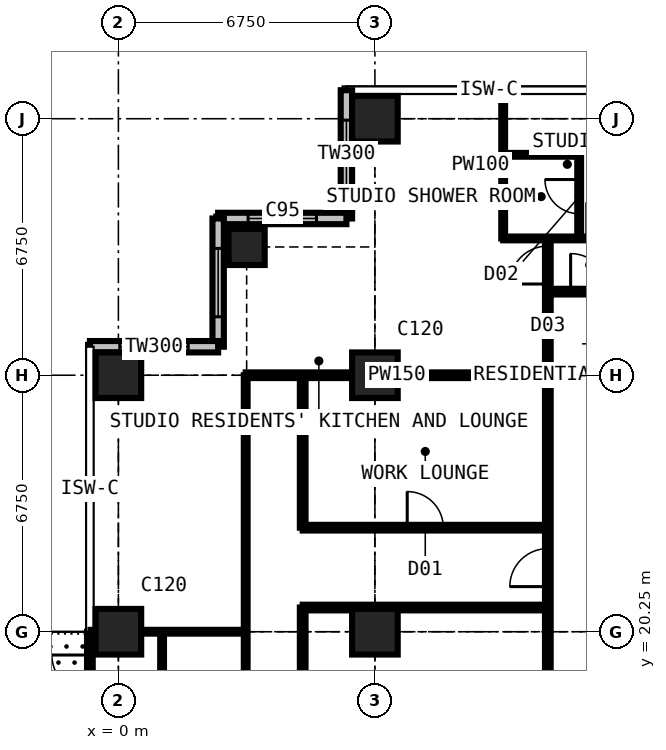
"""IFC4 building model, lengths in metres.
Left out: names, types, materials, properties, quantities, classifications, styles, units other than length and angle.
Written with IfcOpenShell. Run it as: python <this file> out.ifc"""

import sys

from ifc_helpers import new_model, si_unit, direction, frame, frame_2d, origin, origin_2d, place, context, subcontext, project, spatial, rectangle, extrude, element, fill, save


model = new_model("IFC4")
c1 = context("Model", 3, precision=1e-05, world=origin(), true_north=direction((0.0, 1.0)))
c2 = subcontext(c1, "Body", "Model", "MODEL_VIEW")
j1 = project(units=[si_unit("LENGTHUNIT", "METRE"), si_unit("PLANEANGLEUNIT", "RADIAN")], contexts=[c1])
p1 = place(None, origin())
s1 = spatial("IfcSite", under=j1, at=p1, CompositionType="ELEMENT")
p2 = place(p1, origin())
s2 = spatial("IfcBuilding", under=s1, at=p2, CompositionType="ELEMENT")
p3 = place(p2, frame((0.0, 0.0, 192.6)))
s3 = spatial("IfcBuildingStorey", under=s2, at=p3, CompositionType="ELEMENT", Elevation=192.6)
for number, where, z_axis, x_axis in (
    (1, (0.0, 20.25, 0.0), (0.0, 0.0, 1.0), (1.0, 0.0, 0.0)),
    (2, (0.0, 27.0, 0.0), (0.0, 0.0, 1.0), (1.0, 0.0, 0.0)),
):
    element("IfcColumn", number, at=place(p3, frame(where, z_axis=z_axis, x_axis=x_axis)), inside=s3, PredefinedType="COLUMN", context=c2, shape_type="SweptSolid", body=[
        extrude(rectangle(XDim=1.2, YDim=1.2, at=origin_2d()), origin(), (0.0, 0.0, 1.0), 3.6),
    ])
p4 = place(p3, frame((3.375, 30.375, 0.0), z_axis=(0.0, 0.0, 1.0), x_axis=(1.0, 0.0, 0.0)))
e3 = element("IfcColumn", 3, at=p4, inside=s3, PredefinedType="COLUMN", context=c2, shape_type="SweptSolid", body=[
    extrude(rectangle(XDim=0.95, YDim=0.95, at=origin_2d()), origin(), (0.0, 0.0, 1.0), 3.6),
])
for number, where, z_axis, x_axis in (
    (4, (6.75, 20.25, 0.0), (0.0, 0.0, 1.0), (1.0, 0.0, 0.0)),
    (5, (6.75, 27.0, 0.0), (0.0, 0.0, 1.0), (1.0, 0.0, 0.0)),
    (6, (6.75, 33.75, 0.0), (0.0, 0.0, 1.0), (1.0, 0.0, 0.0)),
):
    element("IfcColumn", number, at=place(p3, frame(where, z_axis=z_axis, x_axis=x_axis)), inside=s3, PredefinedType="COLUMN", context=c2, shape_type="SweptSolid", body=[
        extrude(rectangle(XDim=1.2, YDim=1.2, at=origin_2d()), origin(), (0.0, 0.0, 1.0), 3.6),
    ])
p5 = place(p3, frame((6.0, 34.5, 0.0), z_axis=(0.0, 0.0, 1.0), x_axis=(0.0, -1.0, 0.0)))
e7 = element("IfcWall", 7, at=p5, inside=s3, PredefinedType="SOLIDWALL", context=c2, shape_type="SweptSolid", body=[
    extrude(rectangle(XDim=3.375, YDim=0.3, at=frame_2d((1.688, 0.0))), origin(), (0.0, 0.0, 1.0), 3.375),
])
p6 = place(p5, frame((0.788, 0.0, 0.6)))
e8 = element("IfcOpeningElement", 8, at=p6, cuts=e7, PredefinedType="OPENING", context=c2, shape_type="SweptSolid", body=[
    extrude(rectangle(XDim=1.8, YDim=2.1, at=frame_2d((0.9, 1.05))), frame((0.0, 0.16, 0.0), z_axis=(0.0, -1.0, 0.0), x_axis=(1.0, 0.0, 0.0)), (0.0, 0.0, 1.0), 0.32),
])
p7 = place(p3, frame((6.0, 31.125, 0.0), z_axis=(0.0, 0.0, 1.0), x_axis=(-1.0, 0.0, 0.0)))
e9 = element("IfcWall", 9, at=p7, inside=s3, PredefinedType="SOLIDWALL", context=c2, shape_type="SweptSolid", body=[
    extrude(rectangle(XDim=3.375, YDim=0.3, at=frame_2d((1.688, 0.0))), origin(), (0.0, 0.0, 1.0), 3.375),
])
p8 = place(p7, frame((0.788, 0.0, 0.6)))
e10 = element("IfcOpeningElement", 10, at=p8, cuts=e9, PredefinedType="OPENING", context=c2, shape_type="SweptSolid", body=[
    extrude(rectangle(XDim=1.8, YDim=2.1, at=frame_2d((0.9, 1.05))), frame((0.0, 0.16, 0.0), z_axis=(0.0, -1.0, 0.0), x_axis=(1.0, 0.0, 0.0)), (0.0, 0.0, 1.0), 0.32),
])
p9 = place(p3, frame((2.625, 31.125, 0.0), z_axis=(0.0, 0.0, 1.0), x_axis=(0.0, -1.0, 0.0)))
e11 = element("IfcWall", 11, at=p9, inside=s3, PredefinedType="SOLIDWALL", context=c2, shape_type="SweptSolid", body=[
    extrude(rectangle(XDim=3.375, YDim=0.3, at=frame_2d((1.688, 0.0))), origin(), (0.0, 0.0, 1.0), 3.375),
])
p10 = place(p9, frame((0.788, 0.0, 0.6)))
e12 = element("IfcOpeningElement", 12, at=p10, cuts=e11, PredefinedType="OPENING", context=c2, shape_type="SweptSolid", body=[
    extrude(rectangle(XDim=1.8, YDim=2.1, at=frame_2d((0.9, 1.05))), frame((0.0, 0.16, 0.0), z_axis=(0.0, -1.0, 0.0), x_axis=(1.0, 0.0, 0.0)), (0.0, 0.0, 1.0), 0.32),
])
p11 = place(p3, frame((2.625, 27.75, 0.0), z_axis=(0.0, 0.0, 1.0), x_axis=(-1.0, 0.0, 0.0)))
e13 = element("IfcWall", 13, at=p11, inside=s3, PredefinedType="SOLIDWALL", context=c2, shape_type="SweptSolid", body=[
    extrude(rectangle(XDim=3.375, YDim=0.3, at=frame_2d((1.688, 0.0))), origin(), (0.0, 0.0, 1.0), 3.375),
])
p12 = place(p11, frame((0.788, 0.0, 0.6)))
e14 = element("IfcOpeningElement", 14, at=p12, cuts=e13, PredefinedType="OPENING", context=c2, shape_type="SweptSolid", body=[
    extrude(rectangle(XDim=1.8, YDim=2.1, at=frame_2d((0.9, 1.05))), frame((0.0, 0.16, 0.0), z_axis=(0.0, -1.0, 0.0), x_axis=(1.0, 0.0, 0.0)), (0.0, 0.0, 1.0), 0.32),
])
p13 = place(p3, frame((-0.75, 13.5, 0.0), z_axis=(0.0, 0.0, 1.0), x_axis=(0.0, 1.0, 0.0)))
e15 = element("IfcWall", 15, at=p13, inside=s3, PredefinedType="SOLIDWALL", context=c2, shape_type="SweptSolid", body=[
    extrude(rectangle(XDim=6.75, YDim=0.15, at=frame_2d((3.375, 0.0))), origin(), (0.0, 0.0, 1.0), 3.375),
])
p14 = place(p13, frame((0.613, 0.0, 0.0)))
e16 = element("IfcOpeningElement", 16, at=p14, cuts=e15, PredefinedType="OPENING", context=c2, shape_type="SweptSolid", body=[
    extrude(rectangle(XDim=1.0, YDim=2.2, at=frame_2d((0.5, 1.1))), frame((0.0, 0.085, 0.0), z_axis=(0.0, -1.0, 0.0), x_axis=(1.0, 0.0, 0.0)), (0.0, 0.0, 1.0), 0.17),
])
p15 = place(p13, frame((1.725, 0.0, 0.9)))
e17 = element("IfcOpeningElement", 17, at=p15, cuts=e15, PredefinedType="OPENING", context=c2, shape_type="SweptSolid", body=[
    extrude(rectangle(XDim=1.2, YDim=1.8, at=frame_2d((0.6, 0.9))), frame((0.0, 0.085, 0.0), z_axis=(0.0, -1.0, 0.0), x_axis=(1.0, 0.0, 0.0)), (0.0, 0.0, 1.0), 0.17),
])
p16 = place(p13, frame((5.137, 0.0, 0.0)))
e18 = element("IfcOpeningElement", 18, at=p16, cuts=e15, PredefinedType="OPENING", context=c2, shape_type="SweptSolid", body=[
    extrude(rectangle(XDim=1.0, YDim=2.2, at=frame_2d((0.5, 1.1))), frame((0.0, 0.085, 0.0), z_axis=(0.0, -1.0, 0.0), x_axis=(1.0, 0.0, 0.0)), (0.0, 0.0, 1.0), 0.17),
])
p17 = place(p13, frame((3.825, 0.0, 0.9)))
e19 = element("IfcOpeningElement", 19, at=p17, cuts=e15, PredefinedType="OPENING", context=c2, shape_type="SweptSolid", body=[
    extrude(rectangle(XDim=1.2, YDim=1.8, at=frame_2d((0.6, 0.9))), frame((0.0, 0.085, 0.0), z_axis=(0.0, -1.0, 0.0), x_axis=(1.0, 0.0, 0.0)), (0.0, 0.0, 1.0), 0.17),
])
p18 = place(p3, frame((-0.734, 20.25, 0.0), z_axis=(0.0, 0.0, 1.0), x_axis=(1.0, 0.0, 0.0)))
e20 = element("IfcWall", 20, at=p18, inside=s3, PredefinedType="PARTITIONING", context=c2, shape_type="SweptSolid", body=[
    extrude(rectangle(XDim=4.084, YDim=0.1, at=frame_2d((2.042, 0.0))), origin(), (0.0, 0.0, 1.0), 2.877),
])
p19 = place(p3, frame((1.15, 18.25, 0.0), z_axis=(0.0, 0.0, 1.0), x_axis=(0.0, 1.0, 0.0)))
e21 = element("IfcWall", 21, at=p19, inside=s3, PredefinedType="PARTITIONING", context=c2, shape_type="SweptSolid", body=[
    extrude(rectangle(XDim=2.0, YDim=0.1, at=frame_2d((1.0, 0.0))), origin(), (0.0, 0.0, 1.0), 3.375),
])
p20 = place(p3, frame((3.35, 10.125, 0.0), z_axis=(0.0, 0.0, 1.0), x_axis=(0.0, 1.0, 0.0)))
e22 = element("IfcWall", 22, at=p20, inside=s3, PredefinedType="PARTITIONING", context=c2, shape_type="SweptSolid", body=[
    extrude(rectangle(XDim=16.875, YDim=0.1, at=frame_2d((8.438, 0.0))), origin(), (0.0, 0.0, 1.0), 3.375),
])
p21 = place(p20, frame((0.2, 0.0, 0.0)))
e23 = element("IfcOpeningElement", 23, at=p21, cuts=e22, PredefinedType="OPENING", context=c2, shape_type="SweptSolid", body=[
    extrude(rectangle(XDim=0.95, YDim=2.2, at=frame_2d((0.475, 1.1))), frame((0.0, 0.06, 0.0), z_axis=(0.0, -1.0, 0.0), x_axis=(1.0, 0.0, 0.0)), (0.0, 0.0, 1.0), 0.12),
])
p22 = place(p20, frame((3.575, 0.0, 0.0)))
e24 = element("IfcOpeningElement", 24, at=p22, cuts=e22, PredefinedType="OPENING", context=c2, shape_type="SweptSolid", body=[
    extrude(rectangle(XDim=0.95, YDim=2.2, at=frame_2d((0.475, 1.1))), frame((0.0, 0.06, 0.0), z_axis=(0.0, -1.0, 0.0), x_axis=(1.0, 0.0, 0.0)), (0.0, 0.0, 1.0), 0.12),
])
p23 = place(p20, frame((6.95, 0.0, 0.0)))
e25 = element("IfcOpeningElement", 25, at=p23, cuts=e22, PredefinedType="OPENING", context=c2, shape_type="SweptSolid", body=[
    extrude(rectangle(XDim=0.95, YDim=2.2, at=frame_2d((0.475, 1.1))), frame((0.0, 0.06, 0.0), z_axis=(0.0, -1.0, 0.0), x_axis=(1.0, 0.0, 0.0)), (0.0, 0.0, 1.0), 0.12),
])
p24 = place(p3, frame((3.35, 27.0, 0.0), z_axis=(0.0, 0.0, 1.0), x_axis=(1.0, 0.0, 0.0)))
e26 = element("IfcWall", 26, at=p24, inside=s3, PredefinedType="PARTITIONING", context=c2, shape_type="SweptSolid", body=[
    extrude(rectangle(XDim=7.95, YDim=0.15, at=frame_2d((3.975, 0.0))), origin(), (0.0, 0.0, 1.0), 2.806),
])
p25 = place(p3, frame((4.85, 12.775, 0.0), z_axis=(0.0, 0.0, 1.0), x_axis=(0.0, 1.0, 0.0)))
e27 = element("IfcWall", 27, at=p25, inside=s3, PredefinedType="PARTITIONING", context=c2, shape_type="SweptSolid", body=[
    extrude(rectangle(XDim=8.113, YDim=0.15, at=frame_2d((4.056, 0.0))), origin(), (0.0, 0.0, 1.0), 3.375),
])
p26 = place(p25, frame((3.6, 0.0, 0.0)))
e28 = element("IfcOpeningElement", 28, at=p26, cuts=e27, PredefinedType="OPENING", context=c2, shape_type="SweptSolid", body=[
    extrude(rectangle(XDim=0.95, YDim=2.2, at=frame_2d((0.475, 1.1))), frame((0.0, 0.085, 0.0), z_axis=(0.0, -1.0, 0.0), x_axis=(1.0, 0.0, 0.0)), (0.0, 0.0, 1.0), 0.17),
])
p27 = place(p3, frame((4.85, 20.887, 0.0), z_axis=(0.0, 0.0, 1.0), x_axis=(1.0, 0.0, 0.0)))
e29 = element("IfcWall", 29, at=p27, inside=s3, PredefinedType="PARTITIONING", context=c2, shape_type="SweptSolid", body=[
    extrude(rectangle(XDim=6.45, YDim=0.15, at=frame_2d((3.225, 0.0))), origin(), (0.0, 0.0, 1.0), 3.375),
])
p28 = place(p3, frame((4.85, 22.988, 0.0), z_axis=(0.0, 0.0, 1.0), x_axis=(0.0, 1.0, 0.0)))
e30 = element("IfcWall", 30, at=p28, inside=s3, PredefinedType="PARTITIONING", context=c2, shape_type="SweptSolid", body=[
    extrude(rectangle(XDim=4.012, YDim=0.15, at=frame_2d((2.006, 0.0))), origin(), (0.0, 0.0, 1.0), 3.375),
])
p29 = place(p3, frame((4.85, 22.988, 0.0), z_axis=(0.0, 0.0, 1.0), x_axis=(1.0, 0.0, 0.0)))
e31 = element("IfcWall", 31, at=p29, inside=s3, PredefinedType="PARTITIONING", context=c2, shape_type="SweptSolid", body=[
    extrude(rectangle(XDim=6.45, YDim=0.15, at=frame_2d((3.225, 0.0))), origin(), (0.0, 0.0, 1.0), 3.375),
])
p30 = place(p29, frame((2.75, 0.0, 0.0)))
e32 = element("IfcOpeningElement", 32, at=p30, cuts=e31, PredefinedType="OPENING", context=c2, shape_type="SweptSolid", body=[
    extrude(rectangle(XDim=0.95, YDim=2.2, at=frame_2d((0.475, 1.1))), frame((0.0, 0.085, 0.0), z_axis=(0.0, -1.0, 0.0), x_axis=(1.0, 0.0, 0.0)), (0.0, 0.0, 1.0), 0.17),
])
p31 = place(p3, frame((10.125, 30.6, 0.0), z_axis=(0.0, 0.0, 1.0), x_axis=(0.0, 1.0, 0.0)))
e33 = element("IfcWall", 33, at=p31, inside=s3, PredefinedType="PARTITIONING", context=c2, shape_type="SweptSolid", body=[
    extrude(rectangle(XDim=3.884, YDim=0.1, at=frame_2d((1.942, 0.0))), origin(), (0.0, 0.0, 1.0), 3.375),
])
p32 = place(p3, frame((10.125, 30.6, 0.0), z_axis=(0.0, 0.0, 1.0), x_axis=(1.0, 0.0, 0.0)))
e34 = element("IfcWall", 34, at=p32, inside=s3, PredefinedType="PARTITIONING", context=c2, shape_type="SweptSolid", body=[
    extrude(rectangle(XDim=3.375, YDim=0.1, at=frame_2d((1.688, 0.0))), origin(), (0.0, 0.0, 1.0), 3.375),
])
p33 = place(p32, frame((2.2, 0.0, 0.0)))
e35 = element("IfcOpeningElement", 35, at=p33, cuts=e34, PredefinedType="OPENING", context=c2, shape_type="SweptSolid", body=[
    extrude(rectangle(XDim=0.95, YDim=2.2, at=frame_2d((0.475, 1.1))), frame((0.0, 0.06, 0.0), z_axis=(0.0, -1.0, 0.0), x_axis=(1.0, 0.0, 0.0)), (0.0, 0.0, 1.0), 0.12),
])
p34 = place(p3, frame((10.125, 32.8, 0.0), z_axis=(0.0, 0.0, 1.0), x_axis=(1.0, 0.0, 0.0)))
e36 = element("IfcWall", 36, at=p34, inside=s3, PredefinedType="PARTITIONING", context=c2, shape_type="SweptSolid", body=[
    extrude(rectangle(XDim=2.0, YDim=0.1, at=frame_2d((1.0, 0.0))), origin(), (0.0, 0.0, 1.0), 3.375),
])
p35 = place(p3, frame((11.3, 11.3, 0.0), z_axis=(0.0, 0.0, 1.0), x_axis=(0.0, 1.0, 0.0)))
e37 = element("IfcWall", 37, at=p35, inside=s3, PredefinedType="PARTITIONING", context=c2, shape_type="SweptSolid", body=[
    extrude(rectangle(XDim=19.3, YDim=0.15, at=frame_2d((9.65, 0.0))), origin(), (0.0, 0.0, 1.0), 3.375),
])
p36 = place(p35, frame((18.1, 0.0, 0.0)))
e38 = element("IfcOpeningElement", 38, at=p36, cuts=e37, PredefinedType="OPENING", context=c2, shape_type="SweptSolid", body=[
    extrude(rectangle(XDim=1.0, YDim=2.2, at=frame_2d((0.5, 1.1))), frame((0.0, 0.085, 0.0), z_axis=(0.0, -1.0, 0.0), x_axis=(1.0, 0.0, 0.0)), (0.0, 0.0, 1.0), 0.17),
])
p37 = place(p35, frame((10.137, 0.0, 0.0)))
e39 = element("IfcOpeningElement", 39, at=p37, cuts=e37, PredefinedType="OPENING", context=c2, shape_type="SweptSolid", body=[
    extrude(rectangle(XDim=1.0, YDim=2.2, at=frame_2d((0.5, 1.1))), frame((0.0, 0.085, 0.0), z_axis=(0.0, -1.0, 0.0), x_axis=(1.0, 0.0, 0.0)), (0.0, 0.0, 1.0), 0.17),
])
p38 = place(p3, frame((11.3, 29.2, 0.0), z_axis=(0.0, 0.0, 1.0), x_axis=(1.0, 0.0, 0.0)))
e40 = element("IfcWall", 40, at=p38, inside=s3, PredefinedType="PARTITIONING", context=c2, shape_type="SweptSolid", body=[
    extrude(rectangle(XDim=19.809, YDim=0.15, at=frame_2d((9.904, 0.0))), origin(), (0.0, 0.0, 1.0), 3.375),
])
p39 = place(p38, frame((12.9, 0.0, 0.0)))
e41 = element("IfcOpeningElement", 41, at=p39, cuts=e40, PredefinedType="OPENING", context=c2, shape_type="SweptSolid", body=[
    extrude(rectangle(XDim=1.0, YDim=2.2, at=frame_2d((0.5, 1.1))), frame((0.0, 0.085, 0.0), z_axis=(0.0, -1.0, 0.0), x_axis=(1.0, 0.0, 0.0)), (0.0, 0.0, 1.0), 0.17),
])
p40 = place(p38, frame((5.825, 0.0, 0.0)))
e42 = element("IfcOpeningElement", 42, at=p40, cuts=e40, PredefinedType="OPENING", context=c2, shape_type="SweptSolid", body=[
    extrude(rectangle(XDim=0.95, YDim=2.2, at=frame_2d((0.475, 1.1))), frame((0.0, 0.085, 0.0), z_axis=(0.0, -1.0, 0.0), x_axis=(1.0, 0.0, 0.0)), (0.0, 0.0, 1.0), 0.17),
])
p41 = place(p38, frame((0.6, 0.0, 0.0)))
e43 = element("IfcOpeningElement", 43, at=p41, cuts=e40, PredefinedType="OPENING", context=c2, shape_type="SweptSolid", body=[
    extrude(rectangle(XDim=1.0, YDim=2.2, at=frame_2d((0.5, 1.1))), frame((0.0, 0.085, 0.0), z_axis=(0.0, -1.0, 0.0), x_axis=(1.0, 0.0, 0.0)), (0.0, 0.0, 1.0), 0.17),
])
p42 = place(p3, frame((12.125, 30.6, 0.0), z_axis=(0.0, 0.0, 1.0), x_axis=(0.0, 1.0, 0.0)))
e44 = element("IfcWall", 44, at=p42, inside=s3, PredefinedType="PARTITIONING", context=c2, shape_type="SweptSolid", body=[
    extrude(rectangle(XDim=2.2, YDim=0.1, at=frame_2d((1.1, 0.0))), origin(), (0.0, 0.0, 1.0), 3.375),
])
p43 = place(p42, frame((0.65, 0.0, 0.0)))
e45 = element("IfcOpeningElement", 45, at=p43, cuts=e44, PredefinedType="OPENING", context=c2, shape_type="SweptSolid", body=[
    extrude(rectangle(XDim=0.9, YDim=2.2, at=frame_2d((0.45, 1.1))), frame((0.0, 0.06, 0.0), z_axis=(0.0, -1.0, 0.0), x_axis=(1.0, 0.0, 0.0)), (0.0, 0.0, 1.0), 0.12),
])
p44 = place(p6, origin())
e46 = element("IfcWindow", 46, at=p44, inside=s3, PartitioningType="SINGLE_PANEL", PredefinedType="WINDOW", context=c2, shape_type="SweptSolid", body=[
    extrude(rectangle(XDim=1.8, YDim=2.1, at=frame_2d((0.9, 1.05))), frame((0.0, 0.03, 0.0), z_axis=(0.0, -1.0, 0.0), x_axis=(1.0, 0.0, 0.0)), (0.0, 0.0, 1.0), 0.06),
])
fill(e8, e46)
p45 = place(p8, origin())
e47 = element("IfcWindow", 47, at=p45, inside=s3, PartitioningType="SINGLE_PANEL", PredefinedType="WINDOW", context=c2, shape_type="SweptSolid", body=[
    extrude(rectangle(XDim=1.8, YDim=2.1, at=frame_2d((0.9, 1.05))), frame((0.0, 0.03, 0.0), z_axis=(0.0, -1.0, 0.0), x_axis=(1.0, 0.0, 0.0)), (0.0, 0.0, 1.0), 0.06),
])
fill(e10, e47)
p46 = place(p10, origin())
e48 = element("IfcWindow", 48, at=p46, inside=s3, PartitioningType="SINGLE_PANEL", PredefinedType="WINDOW", context=c2, shape_type="SweptSolid", body=[
    extrude(rectangle(XDim=1.8, YDim=2.1, at=frame_2d((0.9, 1.05))), frame((0.0, 0.03, 0.0), z_axis=(0.0, -1.0, 0.0), x_axis=(1.0, 0.0, 0.0)), (0.0, 0.0, 1.0), 0.06),
])
fill(e12, e48)
p47 = place(p12, origin())
e49 = element("IfcWindow", 49, at=p47, inside=s3, PartitioningType="SINGLE_PANEL", PredefinedType="WINDOW", context=c2, shape_type="SweptSolid", body=[
    extrude(rectangle(XDim=1.8, YDim=2.1, at=frame_2d((0.9, 1.05))), frame((0.0, 0.03, 0.0), z_axis=(0.0, -1.0, 0.0), x_axis=(1.0, 0.0, 0.0)), (0.0, 0.0, 1.0), 0.06),
])
fill(e14, e49)
p48 = place(p16, origin())
e50 = element("IfcDoor", 50, at=p48, inside=s3, OperationType="SINGLE_SWING_RIGHT", PredefinedType="DOOR", context=c2, shape_type="SweptSolid", body=[
    extrude(rectangle(XDim=1.0, YDim=2.2, at=frame_2d((0.5, 1.1))), frame((0.0, 0.025, 0.0), z_axis=(0.0, -1.0, 0.0), x_axis=(1.0, 0.0, 0.0)), (0.0, 0.0, 1.0), 0.05),
])
fill(e18, e50)
p49 = place(p43, origin())
e51 = element("IfcDoor", 51, at=p49, inside=s3, OperationType="SINGLE_SWING_RIGHT", PredefinedType="DOOR", context=c2, shape_type="SweptSolid", body=[
    extrude(rectangle(XDim=0.9, YDim=2.2, at=frame_2d((0.45, 1.1))), frame((0.0, 0.025, 0.0), z_axis=(0.0, -1.0, 0.0), x_axis=(1.0, 0.0, 0.0)), (0.0, 0.0, 1.0), 0.05),
])
fill(e45, e51)
p50 = place(p41, origin())
e52 = element("IfcDoor", 52, at=p50, inside=s3, OperationType="SINGLE_SWING_LEFT", PredefinedType="DOOR", context=c2, shape_type="SweptSolid", body=[
    extrude(rectangle(XDim=1.0, YDim=2.2, at=frame_2d((0.5, 1.1))), frame((0.0, 0.025, 0.0), z_axis=(0.0, -1.0, 0.0), x_axis=(1.0, 0.0, 0.0)), (0.0, 0.0, 1.0), 0.05),
])
fill(e43, e52)
p51 = place(p36, origin())
e53 = element("IfcDoor", 53, at=p51, inside=s3, OperationType="SINGLE_SWING_LEFT", PredefinedType="DOOR", context=c2, shape_type="SweptSolid", body=[
    extrude(rectangle(XDim=1.0, YDim=2.2, at=frame_2d((0.5, 1.1))), frame((0.0, 0.025, 0.0), z_axis=(0.0, -1.0, 0.0), x_axis=(1.0, 0.0, 0.0)), (0.0, 0.0, 1.0), 0.05),
])
fill(e38, e53)
p52 = place(p37, origin())
e54 = element("IfcDoor", 54, at=p52, inside=s3, OperationType="SINGLE_SWING_LEFT", PredefinedType="DOOR", context=c2, shape_type="SweptSolid", body=[
    extrude(rectangle(XDim=1.0, YDim=2.2, at=frame_2d((0.5, 1.1))), frame((0.0, 0.025, 0.0), z_axis=(0.0, -1.0, 0.0), x_axis=(1.0, 0.0, 0.0)), (0.0, 0.0, 1.0), 0.05),
])
fill(e39, e54)
p53 = place(p30, origin())
e55 = element("IfcDoor", 55, at=p53, inside=s3, OperationType="SINGLE_SWING_LEFT", PredefinedType="DOOR", context=c2, shape_type="SweptSolid", body=[
    extrude(rectangle(XDim=0.95, YDim=2.2, at=frame_2d((0.475, 1.1))), frame((0.0, 0.025, 0.0), z_axis=(0.0, -1.0, 0.0), x_axis=(1.0, 0.0, 0.0)), (0.0, 0.0, 1.0), 0.05),
])
fill(e32, e55)
save(model, sys.argv[1])
